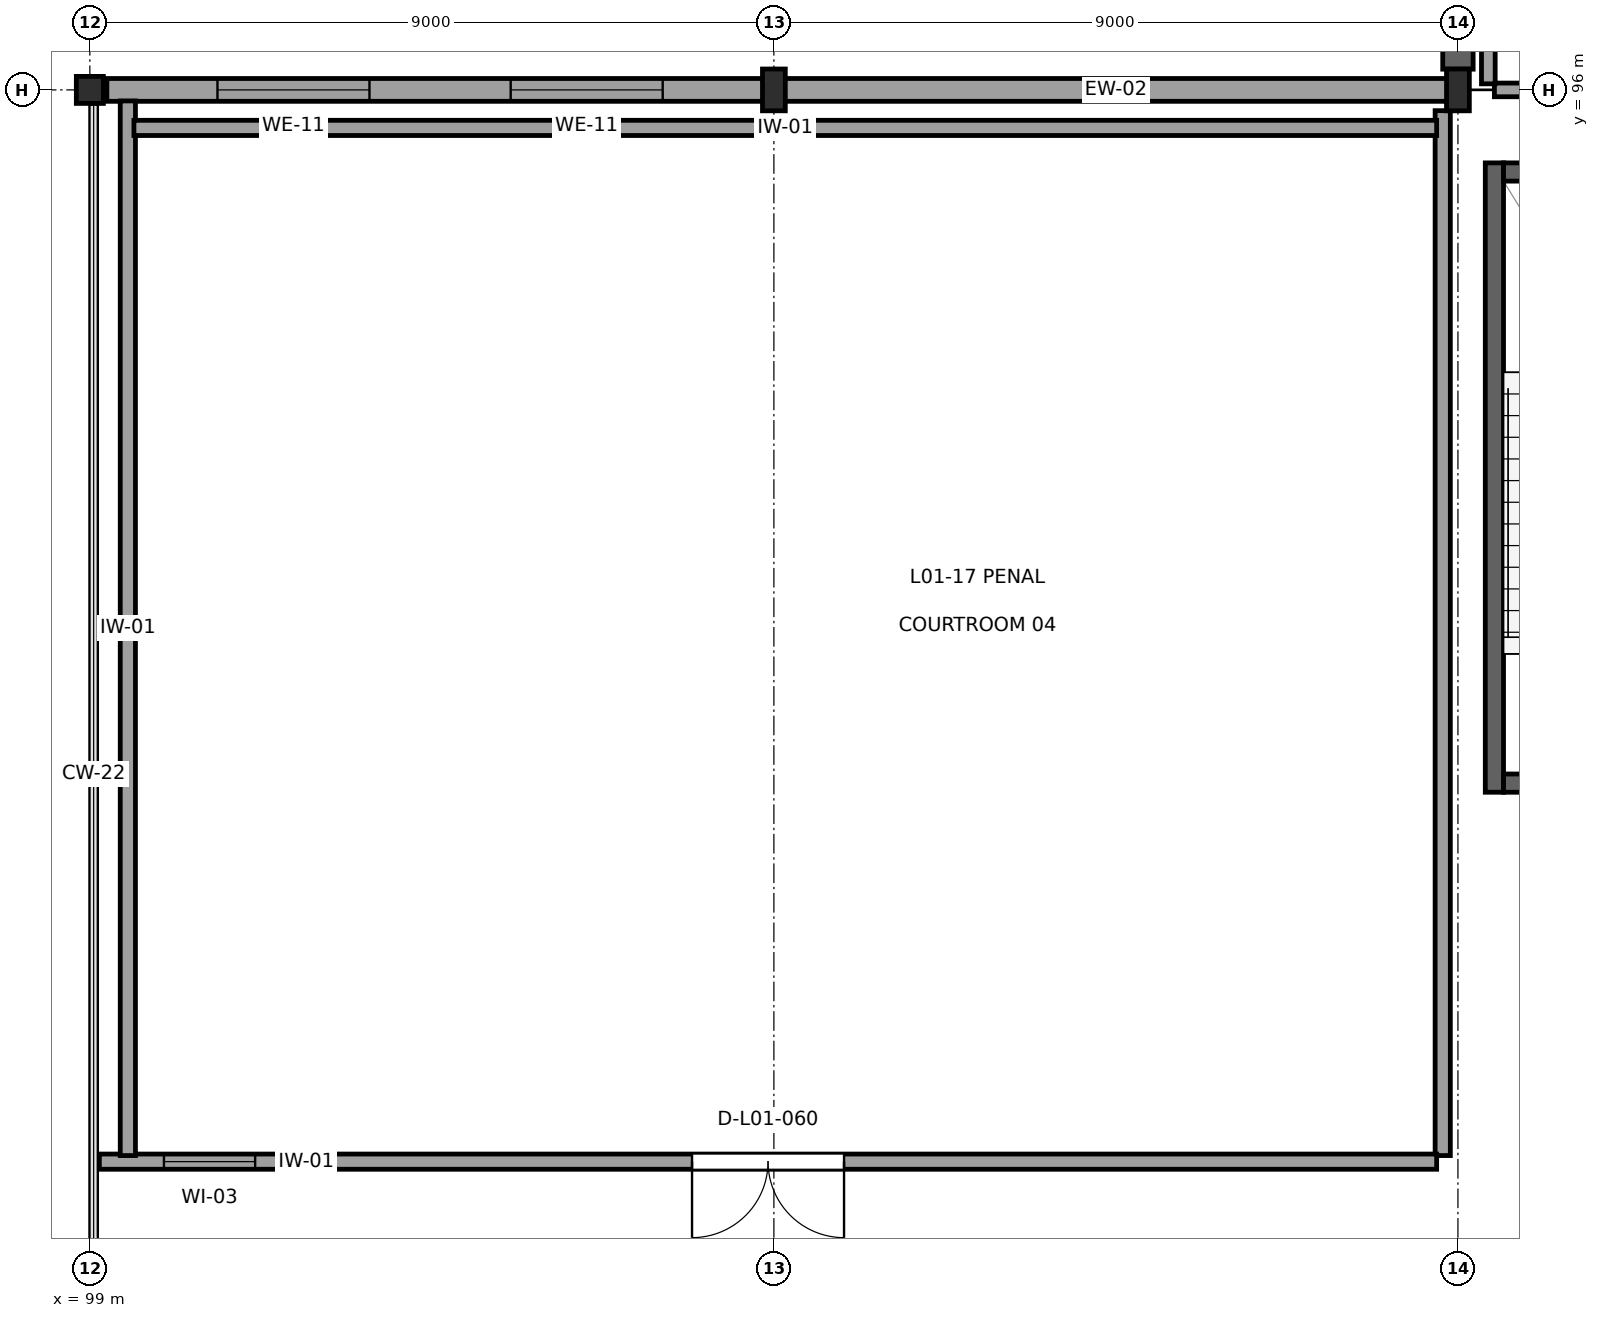
"""IFC4 building model, lengths in metres.
Left out: names, types, materials, properties, quantities, classifications, styles, units other than length and angle.
Written with IfcOpenShell. Run it as: python <this file> out.ifc"""

import sys

from ifc_helpers import new_model, si_unit, direction, frame, frame_2d, origin, origin_2d, place, context, subcontext, project, spatial, rectangle, hollow_circle, i_section, extrude, element, fill, save


model = new_model("IFC4")
c1 = context("Model", 3, precision=1e-05, world=origin(), true_north=direction((0.0, 1.0)))
c2 = subcontext(c1, "Body", "Model", "MODEL_VIEW")
j1 = project(units=[si_unit("LENGTHUNIT", "METRE"), si_unit("PLANEANGLEUNIT", "RADIAN")], contexts=[c1])
p1 = place(None, origin())
s1 = spatial("IfcSite", under=j1, at=p1, CompositionType="ELEMENT")
p2 = place(p1, origin())
s2 = spatial("IfcBuilding", under=s1, at=p2, CompositionType="ELEMENT")
p3 = place(p2, frame((0.0, 0.0, 5.4)))
s3 = spatial("IfcBuildingStorey", under=s2, at=p3, CompositionType="ELEMENT", Elevation=5.4)
p4 = place(p3, frame((99.0, 96.0, 0.0), z_axis=(0.0, 0.0, 1.0), x_axis=(1.0, 0.0, 0.0)))
e1 = element("IfcColumn", 1, at=p4, inside=s3, PredefinedType="PILASTER", context=c2, shape_type="SweptSolid", body=[
    extrude(hollow_circle(Radius=0.178, WallThickness=0.016, at=origin_2d()), origin(), (0.0, 0.0, 1.0), 4.5),
])
for number, where, z_axis, x_axis in (
    (2, (108.0, 96.0, 0.0), (0.0, 0.0, 1.0), (1.0, 0.0, 0.0)),
    (3, (117.0, 96.0, 0.0), (0.0, 0.0, 1.0), (1.0, 0.0, 0.0)),
):
    element("IfcColumn", number, at=place(p3, frame(where, z_axis=z_axis, x_axis=x_axis)), inside=s3, PredefinedType="COLUMN", context=c2, shape_type="SweptSolid", body=[
        extrude(i_section(OverallWidth=0.3, OverallDepth=0.55, WebThickness=0.015, FlangeThickness=0.029, at=origin_2d()), origin(), (0.0, 0.0, 1.0), 4.5),
    ])
p5 = place(p3, frame((116.992, 96.0, 0.0), z_axis=(0.0, 0.0, 1.0), x_axis=(-1.0, 0.0, 0.0)))
e4 = element("IfcWall", 4, at=p5, inside=s3, PredefinedType="SOLIDWALL", context=c2, shape_type="SweptSolid", body=[
    extrude(rectangle(XDim=8.984, YDim=0.3, at=frame_2d((4.492, 0.0))), origin(), (0.0, 0.0, 1.0), 3.655),
])
p6 = place(p3, frame((107.992, 96.0, 0.0), z_axis=(0.0, 0.0, 1.0), x_axis=(-1.0, 0.0, 0.0)))
e5 = element("IfcWall", 5, at=p6, inside=s3, PredefinedType="SOLIDWALL", context=c2, shape_type="SweptSolid", body=[
    extrude(rectangle(XDim=8.768, YDim=0.3, at=frame_2d((4.384, 0.0))), origin(), (0.0, 0.0, 1.0), 3.655),
])
p7 = place(p6, frame((1.455, 0.0, 0.8)))
e6 = element("IfcOpeningElement", 6, at=p7, cuts=e5, PredefinedType="OPENING", context=c2, shape_type="SweptSolid", body=[
    extrude(rectangle(XDim=2.0, YDim=2.0, at=frame_2d((1.0, 1.0))), frame((0.0, 0.165, 0.0), z_axis=(0.0, -1.0, 0.0), x_axis=(1.0, 0.0, 0.0)), (0.0, 0.0, 1.0), 0.33),
])
p8 = place(p6, frame((5.313, 0.0, 0.8)))
e7 = element("IfcOpeningElement", 7, at=p8, cuts=e5, PredefinedType="OPENING", context=c2, shape_type="SweptSolid", body=[
    extrude(rectangle(XDim=2.0, YDim=2.0, at=frame_2d((1.0, 1.0))), frame((0.0, 0.165, 0.0), z_axis=(0.0, -1.0, 0.0), x_axis=(1.0, 0.0, 0.0)), (0.0, 0.0, 1.0), 0.33),
])
p9 = place(p3, frame((117.0, 107.862, 0.0), z_axis=(0.0, 0.0, 1.0), x_axis=(0.0, -1.0, 0.0)))
e8 = element("IfcWall", 8, at=p9, inside=s3, PredefinedType="SOLIDWALL", context=c2, shape_type="SweptSolid", body=[
    extrude(rectangle(XDim=11.589, YDim=0.4, at=frame_2d((5.794, 0.0))), origin(), (0.0, 0.0, 1.0), 4.18),
])
p10 = place(p9, frame((2.877, 0.0, 2.35)))
e9 = element("IfcOpeningElement", 9, at=p10, cuts=e8, PredefinedType="OPENING", context=c2, shape_type="SweptSolid", body=[
    extrude(rectangle(XDim=1.2, YDim=0.7, at=frame_2d((0.6, 0.35))), frame((0.0, 0.215, 0.0), z_axis=(0.0, -1.0, 0.0), x_axis=(1.0, 0.0, 0.0)), (0.0, 0.0, 1.0), 0.43),
])
p11 = place(p9, frame((7.512, 0.0, 2.35)))
e10 = element("IfcOpeningElement", 10, at=p11, cuts=e8, PredefinedType="OPENING", context=c2, shape_type="SweptSolid", body=[
    extrude(rectangle(XDim=1.2, YDim=0.7, at=frame_2d((0.6, 0.35))), frame((0.0, 0.215, 0.0), z_axis=(0.0, -1.0, 0.0), x_axis=(1.0, 0.0, 0.0)), (0.0, 0.0, 1.0), 0.43),
])
p12 = place(p3, frame((117.48, 86.76, 0.0), z_axis=(0.0, 0.0, 1.0), x_axis=(0.0, 1.0, 0.0)))
e11 = element("IfcWall", 11, at=p12, inside=s3, PredefinedType="SHEAR", context=c2, shape_type="SweptSolid", body=[
    extrude(rectangle(XDim=8.28, YDim=0.24, at=frame_2d((4.14, 0.0))), origin(), (0.0, 0.0, 1.0), 4.31),
])
for number, where, z_axis, x_axis in (
    (12, (117.6, 86.88, 0.0), (0.0, 0.0, 1.0), (1.0, 0.0, 0.0)),
    (13, (117.6, 94.92, 0.0), (0.0, 0.0, 1.0), (1.0, 0.0, 0.0)),
):
    element("IfcWall", number, at=place(p3, frame(where, z_axis=z_axis, x_axis=x_axis)), inside=s3, PredefinedType="SHEAR", context=c2, shape_type="SweptSolid", body=[
        extrude(rectangle(XDim=3.7, YDim=0.24, at=frame_2d((1.85, 0.0))), origin(), (0.0, 0.0, 1.0), 4.31),
    ])
p13 = place(p3, frame((116.8, 95.727, 0.0), z_axis=(0.0, 0.0, 1.0), x_axis=(0.0, -1.0, 0.0)))
e14 = element("IfcWall", 14, at=p13, inside=s3, PredefinedType="PARTITIONING", context=c2, shape_type="SweptSolid", body=[
    extrude(rectangle(XDim=13.747, YDim=0.2, at=frame_2d((6.874, 0.0))), origin(), (0.0, 0.0, 1.0), 3.545),
])
p14 = place(p3, frame((116.72, 81.9, 0.0), z_axis=(0.0, 0.0, 1.0), x_axis=(-1.0, 0.0, 0.0)))
e15 = element("IfcWall", 15, at=p14, inside=s3, PredefinedType="PARTITIONING", context=c2, shape_type="SweptSolid", body=[
    extrude(rectangle(XDim=17.595, YDim=0.2, at=frame_2d((8.797, 0.0))), origin(), (0.0, 0.0, 1.0), 4.14),
])
p15 = place(p14, frame((7.797, 0.0, 0.0)))
e16 = element("IfcOpeningElement", 16, at=p15, cuts=e15, PredefinedType="OPENING", context=c2, shape_type="SweptSolid", body=[
    extrude(rectangle(XDim=2.0, YDim=2.6, at=frame_2d((1.0, 1.3))), frame((0.0, 0.115, 0.0), z_axis=(0.0, -1.0, 0.0), x_axis=(1.0, 0.0, 0.0)), (0.0, 0.0, 1.0), 0.23),
])
p16 = place(p14, frame((15.545, 0.0, 1.05)))
e17 = element("IfcOpeningElement", 17, at=p16, cuts=e15, PredefinedType="OPENING", context=c2, shape_type="SweptSolid", body=[
    extrude(rectangle(XDim=1.2, YDim=1.0, at=frame_2d((0.6, 0.5))), frame((0.0, 0.115, 0.0), z_axis=(0.0, -1.0, 0.0), x_axis=(1.0, 0.0, 0.0)), (0.0, 0.0, 1.0), 0.23),
])
p17 = place(p3, frame((99.5, 81.98, 0.0), z_axis=(0.0, 0.0, 1.0), x_axis=(0.0, 1.0, 0.0)))
e18 = element("IfcWall", 18, at=p17, inside=s3, PredefinedType="PARTITIONING", context=c2, shape_type="SweptSolid", body=[
    extrude(rectangle(XDim=13.875, YDim=0.2, at=frame_2d((6.938, 0.0))), origin(), (0.0, 0.0, 1.0), 4.14),
])
p18 = place(p3, frame((99.58, 95.5, 0.0), z_axis=(0.0, 0.0, 1.0), x_axis=(1.0, 0.0, 0.0)))
e19 = element("IfcWall", 19, at=p18, inside=s3, PredefinedType="PARTITIONING", context=c2, shape_type="SweptSolid", body=[
    extrude(rectangle(XDim=17.14, YDim=0.2, at=frame_2d((8.57, 0.0))), origin(), (0.0, 0.0, 1.0), 4.14),
])
p19 = place(p3, frame((125.92, 96.0, 0.0), z_axis=(0.0, 0.0, 1.0), x_axis=(-1.0, 0.0, 0.0)))
e20 = element("IfcWall", 20, at=p19, inside=s3, PredefinedType="PARTITIONING", context=c2, shape_type="SweptSolid", body=[
    extrude(rectangle(XDim=8.44, YDim=0.18, at=frame_2d((4.22, 0.0))), origin(), (0.0, 0.0, 1.0), 3.655),
])
p20 = place(p3, frame((117.4, 96.08, 0.0), z_axis=(0.0, 0.0, 1.0), x_axis=(0.0, 1.0, 0.0)))
e21 = element("IfcWall", 21, at=p20, inside=s3, PredefinedType="PARTITIONING", context=c2, shape_type="SweptSolid", body=[
    extrude(rectangle(XDim=15.84, YDim=0.18, at=frame_2d((7.92, 0.0))), origin(), (0.0, 0.0, 1.0), 4.14),
])
p21 = place(p7, origin())
e22 = element("IfcWindow", 22, at=p21, inside=s3, PartitioningType="SINGLE_PANEL", PredefinedType="WINDOW", context=c2, shape_type="SweptSolid", body=[
    extrude(rectangle(XDim=2.0, YDim=2.0, at=frame_2d((1.0, 1.0))), frame((0.0, 0.03, 0.0), z_axis=(0.0, -1.0, 0.0), x_axis=(1.0, 0.0, 0.0)), (0.0, 0.0, 1.0), 0.06),
])
fill(e6, e22)
p22 = place(p8, origin())
e23 = element("IfcWindow", 23, at=p22, inside=s3, PartitioningType="SINGLE_PANEL", PredefinedType="WINDOW", context=c2, shape_type="SweptSolid", body=[
    extrude(rectangle(XDim=2.0, YDim=2.0, at=frame_2d((1.0, 1.0))), frame((0.0, 0.03, 0.0), z_axis=(0.0, -1.0, 0.0), x_axis=(1.0, 0.0, 0.0)), (0.0, 0.0, 1.0), 0.06),
])
fill(e7, e23)
p23 = place(p15, origin())
e24 = element("IfcDoor", 24, at=p23, inside=s3, OperationType="DOUBLE_DOOR_SINGLE_SWING", PredefinedType="DOOR", context=c2, shape_type="SweptSolid", body=[
    extrude(rectangle(XDim=2.0, YDim=2.6, at=frame_2d((1.0, 1.3))), frame((0.0, 0.025, 0.0), z_axis=(0.0, -1.0, 0.0), x_axis=(1.0, 0.0, 0.0)), (0.0, 0.0, 1.0), 0.05),
])
fill(e16, e24)
p24 = place(p16, origin())
e25 = element("IfcWindow", 25, at=p24, inside=s3, PartitioningType="SINGLE_PANEL", PredefinedType="WINDOW", context=c2, shape_type="SweptSolid", body=[
    extrude(rectangle(XDim=1.2, YDim=1.0, at=frame_2d((0.6, 0.5))), frame((0.0, 0.03, 0.0), z_axis=(0.0, -1.0, 0.0), x_axis=(1.0, 0.0, 0.0)), (0.0, 0.0, 1.0), 0.06),
])
fill(e17, e25)
save(model, sys.argv[1])
